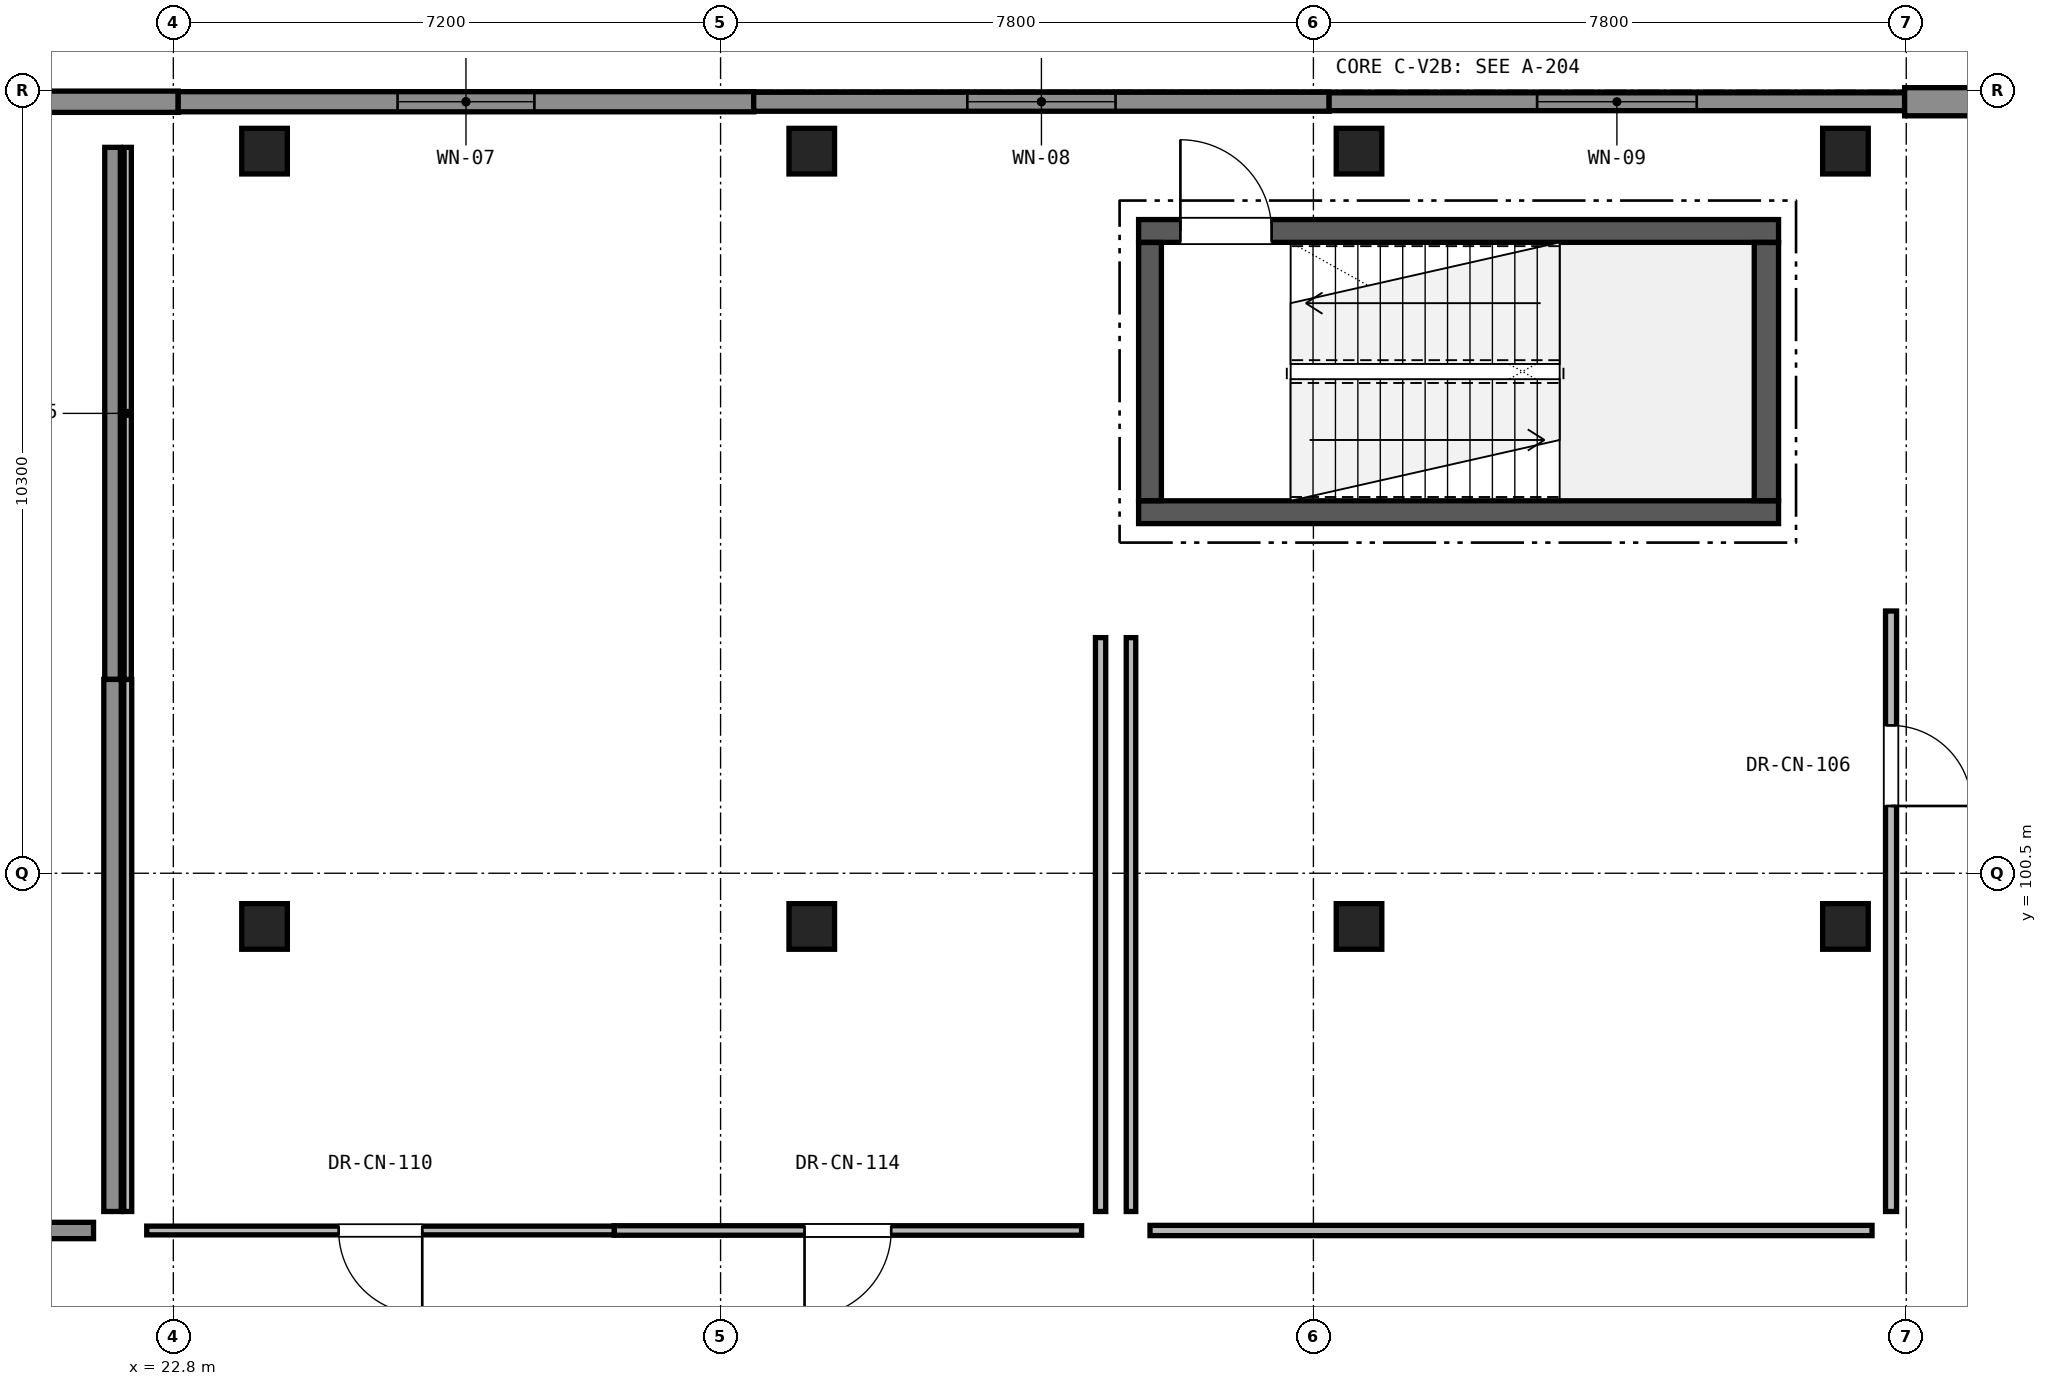
"""IFC4 building model, lengths in metres.
Left out: names, types, materials, properties, quantities, classifications, styles, units other than length and angle.
Written with IfcOpenShell. Run it as: python <this file> out.ifc"""

import sys

from ifc_helpers import new_model, si_unit, direction, frame, frame_2d, origin, origin_2d, place, context, subcontext, project, spatial, rectangle, extrude, element, fill, save


model = new_model("IFC4")
c1 = context("Model", 3, precision=1e-05, world=origin(), true_north=direction((0.0, 1.0)))
c2 = subcontext(c1, "Body", "Model", "MODEL_VIEW")
j1 = project(units=[si_unit("LENGTHUNIT", "METRE"), si_unit("PLANEANGLEUNIT", "RADIAN")], contexts=[c1])
p1 = place(None, origin())
s1 = spatial("IfcSite", under=j1, at=p1, CompositionType="ELEMENT")
p2 = place(p1, origin())
s2 = spatial("IfcBuilding", under=s1, at=p2, CompositionType="ELEMENT")
p3 = place(p2, frame((0.0, 0.0, 5.1)))
s3 = spatial("IfcBuildingStorey", under=s2, at=p3, CompositionType="ELEMENT", Elevation=5.1)
for number, where, z_axis, x_axis in (
    (1, (24.0, 99.8, 0.0), (0.0, 0.0, 1.0), (1.0, 0.0, 0.0)),
    (2, (24.0, 110.0, 0.0), (0.0, 0.0, 1.0), (1.0, 0.0, 0.0)),
    (3, (31.2, 99.8, 0.0), (0.0, 0.0, 1.0), (1.0, 0.0, 0.0)),
    (4, (31.2, 110.0, 0.0), (0.0, 0.0, 1.0), (1.0, 0.0, 0.0)),
    (5, (38.4, 99.8, 0.0), (0.0, 0.0, 1.0), (1.0, 0.0, 0.0)),
    (6, (38.4, 110.0, 0.0), (0.0, 0.0, 1.0), (1.0, 0.0, 0.0)),
    (7, (44.8, 99.8, 0.0), (0.0, 0.0, 1.0), (1.0, 0.0, 0.0)),
    (8, (44.8, 110.0, 0.0), (0.0, 0.0, 1.0), (1.0, 0.0, 0.0)),
):
    element("IfcColumn", number, at=place(p3, frame(where, z_axis=z_axis, x_axis=x_axis)), inside=s3, PredefinedType="COLUMN", context=c2, shape_type="SweptSolid", body=[
        extrude(rectangle(XDim=0.6, YDim=0.6, at=origin_2d()), origin(), (0.0, 0.0, 1.0), 4.42),
    ])
p4 = place(p3, frame((15.293, 110.65, 0.0), z_axis=(0.0, 0.0, 1.0), x_axis=(1.0, 0.0, 0.0)))
e9 = element("IfcWall", 9, at=p4, inside=s3, PredefinedType="SOLIDWALL", context=c2, shape_type="SweptSolid", body=[
    extrude(rectangle(XDim=7.571, YDim=0.28, at=frame_2d((3.786, 0.0))), origin(), (0.0, 0.0, 1.0), 4.13),
])
p5 = place(p4, frame((2.961, 0.0, 0.9)))
e10 = element("IfcOpeningElement", 10, at=p5, cuts=e9, PredefinedType="OPENING", context=c2, shape_type="SweptSolid", body=[
    extrude(rectangle(XDim=1.65, YDim=1.5, at=frame_2d((0.825, 0.75))), frame((0.0, 0.15, 0.0), z_axis=(0.0, -1.0, 0.0), x_axis=(1.0, 0.0, 0.0)), (0.0, 0.0, 1.0), 0.3),
])
p6 = place(p3, frame((22.864, 110.65, 0.0), z_axis=(0.0, 0.0, 1.0), x_axis=(1.0, 0.0, 0.0)))
e11 = element("IfcWall", 11, at=p6, inside=s3, PredefinedType="SOLIDWALL", context=c2, shape_type="SweptSolid", body=[
    extrude(rectangle(XDim=7.572, YDim=0.265, at=frame_2d((3.786, 0.0))), origin(), (0.0, 0.0, 1.0), 4.13),
])
p7 = place(p6, frame((2.886, 0.0, 0.9)))
e12 = element("IfcOpeningElement", 12, at=p7, cuts=e11, PredefinedType="OPENING", context=c2, shape_type="SweptSolid", body=[
    extrude(rectangle(XDim=1.8, YDim=1.5, at=frame_2d((0.9, 0.75))), frame((0.0, 0.142, 0.0), z_axis=(0.0, -1.0, 0.0), x_axis=(1.0, 0.0, 0.0)), (0.0, 0.0, 1.0), 0.285),
])
p8 = place(p3, frame((30.436, 110.65, 0.0), z_axis=(0.0, 0.0, 1.0), x_axis=(1.0, 0.0, 0.0)))
e13 = element("IfcWall", 13, at=p8, inside=s3, PredefinedType="SOLIDWALL", context=c2, shape_type="SweptSolid", body=[
    extrude(rectangle(XDim=7.571, YDim=0.25, at=frame_2d((3.786, 0.0))), origin(), (0.0, 0.0, 1.0), 4.13),
])
p9 = place(p8, frame((2.811, 0.0, 0.9)))
e14 = element("IfcOpeningElement", 14, at=p9, cuts=e13, PredefinedType="OPENING", context=c2, shape_type="SweptSolid", body=[
    extrude(rectangle(XDim=1.95, YDim=1.5, at=frame_2d((0.975, 0.75))), frame((0.0, 0.135, 0.0), z_axis=(0.0, -1.0, 0.0), x_axis=(1.0, 0.0, 0.0)), (0.0, 0.0, 1.0), 0.27),
])
p10 = place(p3, frame((38.007, 110.65, 0.0), z_axis=(0.0, 0.0, 1.0), x_axis=(1.0, 0.0, 0.0)))
e15 = element("IfcWall", 15, at=p10, inside=s3, PredefinedType="SOLIDWALL", context=c2, shape_type="SweptSolid", body=[
    extrude(rectangle(XDim=7.572, YDim=0.235, at=frame_2d((3.786, 0.0))), origin(), (0.0, 0.0, 1.0), 4.13),
])
p11 = place(p10, frame((2.736, 0.0, 0.9)))
e16 = element("IfcOpeningElement", 16, at=p11, cuts=e15, PredefinedType="OPENING", context=c2, shape_type="SweptSolid", body=[
    extrude(rectangle(XDim=2.1, YDim=1.5, at=frame_2d((1.05, 0.75))), frame((0.0, 0.127, 0.0), z_axis=(0.0, -1.0, 0.0), x_axis=(1.0, 0.0, 0.0)), (0.0, 0.0, 1.0), 0.255),
])
p12 = place(p3, frame((45.579, 110.65, 0.0), z_axis=(0.0, 0.0, 1.0), x_axis=(1.0, 0.0, 0.0)))
e17 = element("IfcWall", 17, at=p12, inside=s3, PredefinedType="SOLIDWALL", context=c2, shape_type="SweptSolid", body=[
    extrude(rectangle(XDim=7.571, YDim=0.37, at=frame_2d((3.786, 0.0))), origin(), (0.0, 0.0, 1.0), 4.13),
])
p13 = place(p12, frame((2.661, 0.0, 0.9)))
e18 = element("IfcOpeningElement", 18, at=p13, cuts=e17, PredefinedType="OPENING", context=c2, shape_type="SweptSolid", body=[
    extrude(rectangle(XDim=2.25, YDim=1.5, at=frame_2d((1.125, 0.75))), frame((0.0, 0.195, 0.0), z_axis=(0.0, -1.0, 0.0), x_axis=(1.0, 0.0, 0.0)), (0.0, 0.0, 1.0), 0.39),
])
p14 = place(p3, frame((35.5, 105.25, 0.0), z_axis=(0.0, 0.0, 1.0), x_axis=(1.0, 0.0, 0.0)))
e19 = element("IfcWall", 19, at=p14, inside=s3, PredefinedType="SHEAR", context=c2, shape_type="SweptSolid", body=[
    extrude(rectangle(XDim=8.42, YDim=0.3, at=frame_2d((4.21, 0.0))), origin(), (0.0, 0.0, 1.0), 4.13),
])
p15 = place(p3, frame((35.5, 108.95, 0.0), z_axis=(0.0, 0.0, 1.0), x_axis=(1.0, 0.0, 0.0)))
e20 = element("IfcWall", 20, at=p15, inside=s3, PredefinedType="SHEAR", context=c2, shape_type="SweptSolid", body=[
    extrude(rectangle(XDim=8.42, YDim=0.3, at=frame_2d((4.21, 0.0))), origin(), (0.0, 0.0, 1.0), 4.13),
])
p16 = place(p15, frame((0.55, 0.0, 0.0)))
e21 = element("IfcOpeningElement", 21, at=p16, cuts=e20, PredefinedType="OPENING", context=c2, shape_type="SweptSolid", body=[
    extrude(rectangle(XDim=1.2, YDim=2.2, at=frame_2d((0.6, 1.1))), frame((0.0, 0.16, 0.0), z_axis=(0.0, -1.0, 0.0), x_axis=(1.0, 0.0, 0.0)), (0.0, 0.0, 1.0), 0.32),
])
p17 = place(p3, frame((35.65, 105.402, 0.0), z_axis=(0.0, 0.0, 1.0), x_axis=(0.0, 1.0, 0.0)))
e22 = element("IfcWall", 22, at=p17, inside=s3, PredefinedType="SHEAR", context=c2, shape_type="SweptSolid", body=[
    extrude(rectangle(XDim=3.396, YDim=0.3, at=frame_2d((1.698, 0.0))), origin(), (0.0, 0.0, 1.0), 4.13),
])
p18 = place(p3, frame((43.76, 105.402, 0.0), z_axis=(0.0, 0.0, 1.0), x_axis=(0.0, 1.0, 0.0)))
e23 = element("IfcWall", 23, at=p18, inside=s3, PredefinedType="SHEAR", context=c2, shape_type="SweptSolid", body=[
    extrude(rectangle(XDim=3.396, YDim=0.32, at=frame_2d((1.698, 0.0))), origin(), (0.0, 0.0, 1.0), 4.13),
])
p19 = place(p3, frame((22.0, 110.05, 0.0), z_axis=(0.0, 0.0, 1.0), x_axis=(0.0, -1.0, 0.0)))
e24 = element("IfcWall", 24, at=p19, inside=s3, PredefinedType="PARTITIONING", context=c2, shape_type="SweptSolid", body=[
    extrude(rectangle(XDim=7.0, YDim=0.205, at=frame_2d((3.5, 0.0))), origin(), (0.0, 0.0, 1.0), 3.514),
])
p20 = place(p3, frame((22.0, 103.05, 0.0), z_axis=(0.0, 0.0, 1.0), x_axis=(0.0, -1.0, 0.0)))
e25 = element("IfcWall", 25, at=p20, inside=s3, PredefinedType="PARTITIONING", context=c2, shape_type="SweptSolid", body=[
    extrude(rectangle(XDim=7.0, YDim=0.23, at=frame_2d((3.5, 0.0))), origin(), (0.0, 0.0, 1.0), 3.514),
])
p21 = place(p3, frame((21.75, 95.8, 0.0), z_axis=(0.0, 0.0, 1.0), x_axis=(-1.0, 0.0, 0.0)))
e26 = element("IfcWall", 26, at=p21, inside=s3, PredefinedType="PARTITIONING", context=c2, shape_type="SweptSolid", body=[
    extrude(rectangle(XDim=6.9, YDim=0.215, at=frame_2d((3.45, 0.0))), origin(), (0.0, 0.0, 1.0), 3.53),
])
p22 = place(p21, frame((2.65, 0.0, 0.0)))
e27 = element("IfcOpeningElement", 27, at=p22, cuts=e26, PredefinedType="OPENING", context=c2, shape_type="SweptSolid", body=[
    extrude(rectangle(XDim=1.6, YDim=2.35, at=frame_2d((0.8, 1.175))), frame((0.0, 0.117, 0.0), z_axis=(0.0, -1.0, 0.0), x_axis=(1.0, 0.0, 0.0)), (0.0, 0.0, 1.0), 0.235),
])
p23 = place(p3, frame((35.0, 103.6, 0.0), z_axis=(0.0, 0.0, 1.0), x_axis=(0.0, -1.0, 0.0)))
e28 = element("IfcWall", 28, at=p23, inside=s3, PredefinedType="PARTITIONING", context=c2, shape_type="SweptSolid", body=[
    extrude(rectangle(XDim=7.55, YDim=0.135, at=frame_2d((3.775, 0.0))), origin(), (0.0, 0.0, 1.0), 3.77),
])
p24 = place(p3, frame((34.75, 95.8, 0.0), z_axis=(0.0, 0.0, 1.0), x_axis=(-1.0, 0.0, 0.0)))
e29 = element("IfcWall", 29, at=p24, inside=s3, PredefinedType="PARTITIONING", context=c2, shape_type="SweptSolid", body=[
    extrude(rectangle(XDim=6.15, YDim=0.125, at=frame_2d((3.075, 0.0))), origin(), (0.0, 0.0, 1.0), 3.58),
])
p25 = place(p24, frame((2.505, 0.0, 0.0)))
e30 = element("IfcOpeningElement", 30, at=p25, cuts=e29, PredefinedType="OPENING", context=c2, shape_type="SweptSolid", body=[
    extrude(rectangle(XDim=1.14, YDim=2.2, at=frame_2d((0.57, 1.1))), frame((0.0, 0.073, 0.0), z_axis=(0.0, -1.0, 0.0), x_axis=(1.0, 0.0, 0.0)), (0.0, 0.0, 1.0), 0.145),
])
p26 = place(p3, frame((28.6, 95.8, 0.0), z_axis=(0.0, 0.0, 1.0), x_axis=(-1.0, 0.0, 0.0)))
e31 = element("IfcWall", 31, at=p26, inside=s3, PredefinedType="PARTITIONING", context=c2, shape_type="SweptSolid", body=[
    extrude(rectangle(XDim=6.15, YDim=0.115, at=frame_2d((3.075, 0.0))), origin(), (0.0, 0.0, 1.0), 3.43),
])
p27 = place(p26, frame((2.525, 0.0, 0.0)))
e32 = element("IfcOpeningElement", 32, at=p27, cuts=e31, PredefinedType="OPENING", context=c2, shape_type="SweptSolid", body=[
    extrude(rectangle(XDim=1.1, YDim=2.2, at=frame_2d((0.55, 1.1))), frame((0.0, 0.067, 0.0), z_axis=(0.0, -1.0, 0.0), x_axis=(1.0, 0.0, 0.0)), (0.0, 0.0, 1.0), 0.135),
])
p28 = place(p3, frame((22.2, 96.05, 0.0), z_axis=(0.0, 0.0, 1.0), x_axis=(0.0, 1.0, 0.0)))
e33 = element("IfcWall", 33, at=p28, inside=s3, PredefinedType="PARTITIONING", context=c2, shape_type="SweptSolid", body=[
    extrude(rectangle(XDim=7.0, YDim=0.105, at=frame_2d((3.5, 0.0))), origin(), (0.0, 0.0, 1.0), 3.514),
])
p29 = place(p3, frame((22.2, 103.05, 0.0), z_axis=(0.0, 0.0, 1.0), x_axis=(0.0, 1.0, 0.0)))
e34 = element("IfcWall", 34, at=p29, inside=s3, PredefinedType="PARTITIONING", context=c2, shape_type="SweptSolid", body=[
    extrude(rectangle(XDim=7.0, YDim=0.095, at=frame_2d((3.5, 0.0))), origin(), (0.0, 0.0, 1.0), 3.514),
])
p30 = place(p3, frame((45.4, 103.95, 0.0), z_axis=(0.0, 0.0, 1.0), x_axis=(0.0, -1.0, 0.0)))
e35 = element("IfcWall", 35, at=p30, inside=s3, PredefinedType="PARTITIONING", context=c2, shape_type="SweptSolid", body=[
    extrude(rectangle(XDim=7.9, YDim=0.145, at=frame_2d((3.95, 0.0))), origin(), (0.0, 0.0, 1.0), 3.514),
])
p31 = place(p30, frame((1.505, 0.0, 0.0)))
e36 = element("IfcOpeningElement", 36, at=p31, cuts=e35, PredefinedType="OPENING", context=c2, shape_type="SweptSolid", body=[
    extrude(rectangle(XDim=1.06, YDim=2.15, at=frame_2d((0.53, 1.075))), frame((0.0, 0.083, 0.0), z_axis=(0.0, -1.0, 0.0), x_axis=(1.0, 0.0, 0.0)), (0.0, 0.0, 1.0), 0.165),
])
p32 = place(p3, frame((45.15, 95.8, 0.0), z_axis=(0.0, 0.0, 1.0), x_axis=(-1.0, 0.0, 0.0)))
e37 = element("IfcWall", 37, at=p32, inside=s3, PredefinedType="PARTITIONING", context=c2, shape_type="SweptSolid", body=[
    extrude(rectangle(XDim=9.5, YDim=0.135, at=frame_2d((4.75, 0.0))), origin(), (0.0, 0.0, 1.0), 3.33),
])
p33 = place(p3, frame((35.4, 96.05, 0.0), z_axis=(0.0, 0.0, 1.0), x_axis=(0.0, 1.0, 0.0)))
e38 = element("IfcWall", 38, at=p33, inside=s3, PredefinedType="PARTITIONING", context=c2, shape_type="SweptSolid", body=[
    extrude(rectangle(XDim=7.55, YDim=0.125, at=frame_2d((3.775, 0.0))), origin(), (0.0, 0.0, 1.0), 3.77),
])
p34 = place(p7, origin())
e39 = element("IfcWindow", 39, at=p34, inside=s3, PartitioningType="SINGLE_PANEL", PredefinedType="WINDOW", context=c2, shape_type="SweptSolid", body=[
    extrude(rectangle(XDim=1.8, YDim=1.5, at=frame_2d((0.9, 0.75))), frame((0.0, 0.03, 0.0), z_axis=(0.0, -1.0, 0.0), x_axis=(1.0, 0.0, 0.0)), (0.0, 0.0, 1.0), 0.06),
])
fill(e12, e39)
p35 = place(p9, origin())
e40 = element("IfcWindow", 40, at=p35, inside=s3, PartitioningType="SINGLE_PANEL", PredefinedType="WINDOW", context=c2, shape_type="SweptSolid", body=[
    extrude(rectangle(XDim=1.95, YDim=1.5, at=frame_2d((0.975, 0.75))), frame((0.0, 0.03, 0.0), z_axis=(0.0, -1.0, 0.0), x_axis=(1.0, 0.0, 0.0)), (0.0, 0.0, 1.0), 0.06),
])
fill(e14, e40)
p36 = place(p11, origin())
e41 = element("IfcWindow", 41, at=p36, inside=s3, PartitioningType="SINGLE_PANEL", PredefinedType="WINDOW", context=c2, shape_type="SweptSolid", body=[
    extrude(rectangle(XDim=2.1, YDim=1.5, at=frame_2d((1.05, 0.75))), frame((0.0, 0.03, 0.0), z_axis=(0.0, -1.0, 0.0), x_axis=(1.0, 0.0, 0.0)), (0.0, 0.0, 1.0), 0.06),
])
fill(e16, e41)
p37 = place(p16, origin())
e42 = element("IfcDoor", 42, at=p37, inside=s3, OperationType="SINGLE_SWING_LEFT", PredefinedType="DOOR", context=c2, shape_type="SweptSolid", body=[
    extrude(rectangle(XDim=1.2, YDim=2.2, at=frame_2d((0.6, 1.1))), frame((0.0, 0.025, 0.0), z_axis=(0.0, -1.0, 0.0), x_axis=(1.0, 0.0, 0.0)), (0.0, 0.0, 1.0), 0.05),
])
fill(e21, e42)
p38 = place(p25, origin())
e43 = element("IfcDoor", 43, at=p38, inside=s3, OperationType="SINGLE_SWING_RIGHT", PredefinedType="DOOR", context=c2, shape_type="SweptSolid", body=[
    extrude(rectangle(XDim=1.14, YDim=2.2, at=frame_2d((0.57, 1.1))), frame((0.0, 0.025, 0.0), z_axis=(0.0, -1.0, 0.0), x_axis=(1.0, 0.0, 0.0)), (0.0, 0.0, 1.0), 0.05),
])
fill(e30, e43)
p39 = place(p27, origin())
e44 = element("IfcDoor", 44, at=p39, inside=s3, OperationType="SINGLE_SWING_LEFT", PredefinedType="DOOR", context=c2, shape_type="SweptSolid", body=[
    extrude(rectangle(XDim=1.1, YDim=2.2, at=frame_2d((0.55, 1.1))), frame((0.0, 0.025, 0.0), z_axis=(0.0, -1.0, 0.0), x_axis=(1.0, 0.0, 0.0)), (0.0, 0.0, 1.0), 0.05),
])
fill(e32, e44)
p40 = place(p31, origin())
e45 = element("IfcDoor", 45, at=p40, inside=s3, OperationType="SINGLE_SWING_RIGHT", PredefinedType="DOOR", context=c2, shape_type="SweptSolid", body=[
    extrude(rectangle(XDim=1.06, YDim=2.15, at=frame_2d((0.53, 1.075))), frame((0.0, 0.025, 0.0), z_axis=(0.0, -1.0, 0.0), x_axis=(1.0, 0.0, 0.0)), (0.0, 0.0, 1.0), 0.05),
])
fill(e36, e45)
save(model, sys.argv[1])
